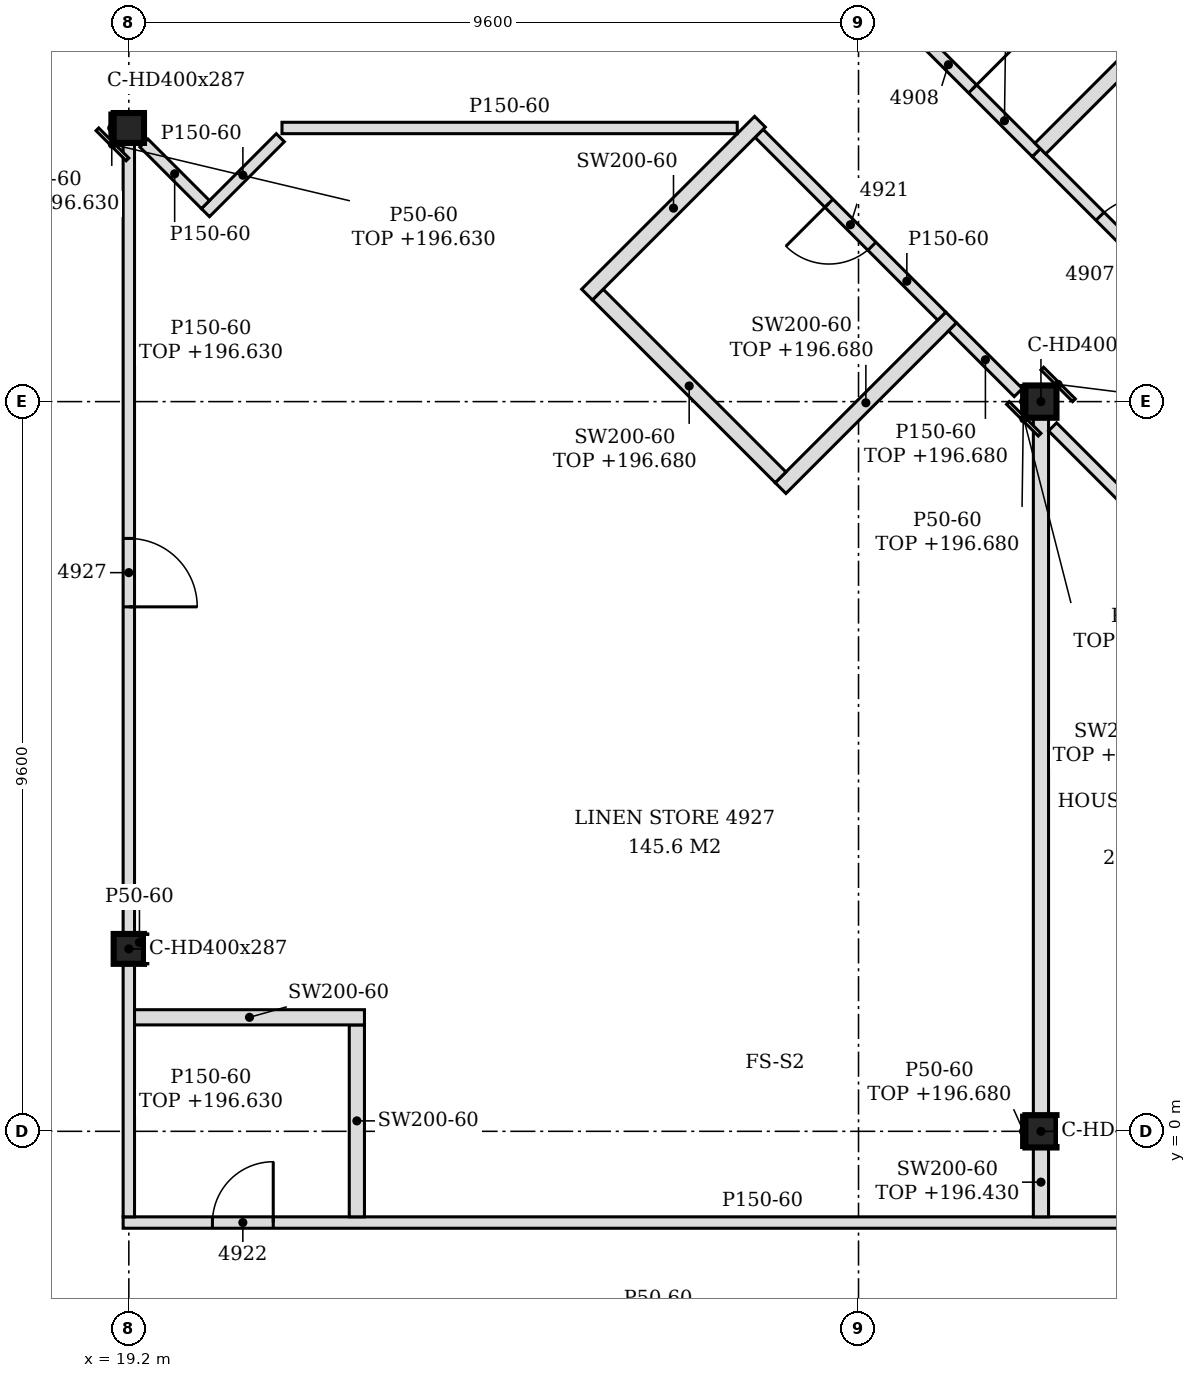
"""IFC4 building model, lengths in metres.
Left out: names, types, materials, properties, quantities, classifications, styles, units other than length and angle.
Written with IfcOpenShell. Run it as: python <this file> out.ifc"""

import sys

from ifc_helpers import new_model, si_unit, direction, frame, frame_2d, origin, origin_2d, place, context, subcontext, project, spatial, polyline, rectangle, i_section, outline, extrude, element, fill, save


model = new_model("IFC4")
c1 = context("Model", 3, precision=1e-05, world=origin(), true_north=direction((0.0, 1.0)))
c2 = subcontext(c1, "Body", "Model", "MODEL_VIEW")
j1 = project(units=[si_unit("LENGTHUNIT", "METRE"), si_unit("PLANEANGLEUNIT", "RADIAN")], contexts=[c1])
p1 = place(None, origin())
s1 = spatial("IfcSite", under=j1, at=p1, CompositionType="ELEMENT")
p2 = place(p1, origin())
s2 = spatial("IfcBuilding", under=s1, at=p2, CompositionType="ELEMENT")
p3 = place(p2, frame((0.0, 0.0, 193.8)))
s3 = spatial("IfcBuildingStorey", under=s2, at=p3, CompositionType="ELEMENT", Elevation=193.8)
for number, where, z_axis, x_axis in (
    (1, (19.2, 2.4, -0.15), (0.0, 0.0, 1.0), (1.0, 0.0, 0.0)),
    (2, (19.2, 13.2, -0.15), (0.0, 0.0, 1.0), (1.0, 0.0, 0.0)),
):
    element("IfcColumn", number, at=place(p3, frame(where, z_axis=z_axis, x_axis=x_axis)), inside=s3, PredefinedType="COLUMN", context=c2, shape_type="SweptSolid", body=[
        extrude(i_section(OverallWidth=0.399, OverallDepth=0.393, WebThickness=0.023, FlangeThickness=0.037, FilletRadius=0.015, at=origin_2d()), origin(), (0.0, 0.0, 1.0), 3.6),
    ])
for number, where, z_axis, x_axis in (
    (3, (31.2, 0.0, -0.15), (0.0, 0.0, 1.0), (1.0, 0.0, 0.0)),
    (4, (31.2, 9.6, -0.15), (0.0, 0.0, 1.0), (1.0, 0.0, 0.0)),
):
    element("IfcColumn", number, at=place(p3, frame(where, z_axis=z_axis, x_axis=x_axis)), inside=s3, PredefinedType="COLUMN", context=c2, shape_type="SweptSolid", body=[
        extrude(i_section(OverallWidth=0.409, OverallDepth=0.425, WebThickness=0.033, FlangeThickness=0.052, FilletRadius=0.015, at=origin_2d()), origin(), (0.0, 0.0, 1.0), 3.6),
    ])
p4 = place(p3, frame((19.125, -1.2, 0.0), z_axis=(0.0, 0.0, 1.0), x_axis=(1.0, 0.0, 0.0)))
e5 = element("IfcWall", 5, at=p4, inside=s3, PredefinedType="PARTITIONING", context=c2, shape_type="SweptSolid", body=[
    extrude(outline(polyline([(0.0, 0.0), (14.85, 0.0), (14.85, 3.45), (12.225, 3.45), (12.223, 2.63), (11.925, 2.63), (11.923, 3.45), (0.225, 3.45), (0.223, 2.83), (0.0, 2.83), (0.0, 0.0)])), frame((0.0, 0.075, 0.0), z_axis=(0.0, -1.0, 0.0), x_axis=(1.0, 0.0, 0.0)), (0.0, 0.0, 1.0), 0.15),
])
p5 = place(p4, frame((1.175, 0.0, 0.0)))
e6 = element("IfcOpeningElement", 6, at=p5, cuts=e5, PredefinedType="OPENING", context=c2, shape_type="SweptSolid", body=[
    extrude(rectangle(XDim=0.8, YDim=2.1, at=frame_2d((0.4, 1.05))), frame((0.0, 0.085, 0.0), z_axis=(0.0, -1.0, 0.0), x_axis=(1.0, 0.0, 0.0)), (0.0, 0.0, 1.0), 0.17),
])
p6 = place(p3, frame((19.2, -1.125, 0.0), z_axis=(0.0, 0.0, 1.0), x_axis=(0.0, 1.0, 0.0)))
e7 = element("IfcWall", 7, at=p6, inside=s3, PredefinedType="PARTITIONING", context=c2, shape_type="SweptSolid", body=[
    extrude(rectangle(XDim=3.329, YDim=0.15, at=frame_2d((1.664, 0.0))), origin(), (0.0, 0.0, 1.0), 2.83),
])
p7 = place(p3, frame((22.2, -1.125, 0.0), z_axis=(0.0, 0.0, 1.0), x_axis=(0.0, 1.0, 0.0)))
e8 = element("IfcWall", 8, at=p7, inside=s3, PredefinedType="PARTITIONING", context=c2, shape_type="SweptSolid", body=[
    extrude(outline(polyline([(0.0, 0.0), (2.525, 0.0), (2.525, 3.45), (1.38, 3.45), (1.378, 2.88), (1.17, 2.88), (1.168, 3.45), (0.0, 3.45), (0.0, 0.0)])), frame((0.0, 0.1, 0.0), z_axis=(0.0, -1.0, 0.0), x_axis=(1.0, 0.0, 0.0)), (0.0, 0.0, 1.0), 0.2),
])
p8 = place(p3, frame((31.2, -1.125, 0.0), z_axis=(0.0, 0.0, 1.0), x_axis=(0.0, 1.0, 0.0)))
e9 = element("IfcWall", 9, at=p8, inside=s3, PredefinedType="PARTITIONING", context=c2, shape_type="SweptSolid", body=[
    extrude(rectangle(XDim=0.913, YDim=0.2, at=frame_2d((0.456, 0.0))), origin(), (0.0, 0.0, 1.0), 2.63),
])
p9 = place(p3, frame((31.2, 0.212, 0.0), z_axis=(0.0, 0.0, 1.0), x_axis=(0.0, 1.0, 0.0)))
e10 = element("IfcWall", 10, at=p9, inside=s3, PredefinedType="PARTITIONING", context=c2, shape_type="SweptSolid", body=[
    extrude(rectangle(XDim=9.175, YDim=0.2, at=frame_2d((4.587, 0.0))), origin(), (0.0, 0.0, 1.0), 2.93),
])
p10 = place(p3, frame((19.275, 1.5, 0.0), z_axis=(0.0, 0.0, 1.0), x_axis=(1.0, 0.0, 0.0)))
e11 = element("IfcWall", 11, at=p10, inside=s3, PredefinedType="PARTITIONING", context=c2, shape_type="SweptSolid", body=[
    extrude(outline(polyline([(0.0, 0.0), (3.025, 0.0), (3.025, 3.45), (0.075, 3.45), (0.073, 2.83), (0.0, 2.83), (0.0, 0.0)])), frame((0.0, 0.1, 0.0), z_axis=(0.0, -1.0, 0.0), x_axis=(1.0, 0.0, 0.0)), (0.0, 0.0, 1.0), 0.2),
])
p11 = place(p3, frame((19.2, 2.596, 0.0), z_axis=(0.0, 0.0, 1.0), x_axis=(0.0, 1.0, 0.0)))
e12 = element("IfcWall", 12, at=p11, inside=s3, PredefinedType="PARTITIONING", context=c2, shape_type="SweptSolid", body=[
    extrude(rectangle(XDim=10.407, YDim=0.15, at=frame_2d((5.204, 0.0))), origin(), (0.0, 0.0, 1.0), 2.83),
])
p12 = place(p11, frame((4.303, 0.0, 0.0)))
e13 = element("IfcOpeningElement", 13, at=p12, cuts=e12, PredefinedType="OPENING", context=c2, shape_type="SweptSolid", body=[
    extrude(rectangle(XDim=0.9, YDim=2.1, at=frame_2d((0.45, 1.05))), frame((0.0, 0.085, 0.0), z_axis=(0.0, -1.0, 0.0), x_axis=(1.0, 0.0, 0.0)), (0.0, 0.0, 1.0), 0.17),
])
p13 = place(p3, frame((33.772, 6.849, 0.0), z_axis=(0.0, 0.0, 1.0), x_axis=(-0.707106781187, 0.707106781187, 0.0)))
e14 = element("IfcWall", 14, at=p13, inside=s3, PredefinedType="PARTITIONING", context=c2, shape_type="SweptSolid", body=[
    extrude(rectangle(XDim=3.421, YDim=0.15, at=frame_2d((1.71, 0.0))), origin(), (0.0, 0.0, 1.0), 2.93),
])
p14 = place(p3, frame((36.172, 7.843, 0.0), z_axis=(0.0, 0.0, 1.0), x_axis=(-0.70712393086, 0.707089631097, 0.0)))
e15 = element("IfcWall", 15, at=p14, inside=s3, PredefinedType="PARTITIONING", context=c2, shape_type="SweptSolid", body=[
    extrude(rectangle(XDim=7.118, YDim=0.15, at=frame_2d((3.559, 0.0))), origin(), (0.0, 0.0, 1.0), 2.83),
])
p15 = place(p14, frame((1.763, 0.0, 0.0)))
e16 = element("IfcOpeningElement", 16, at=p15, cuts=e15, PredefinedType="OPENING", context=c2, shape_type="SweptSolid", body=[
    extrude(rectangle(XDim=0.9, YDim=2.1, at=frame_2d((0.45, 1.05))), frame((0.0, 0.085, 0.0), z_axis=(0.0, -1.0, 0.0), x_axis=(1.0, 0.0, 0.0)), (0.0, 0.0, 1.0), 0.17),
])
p16 = place(p14, frame((5.033, 0.0, 0.0)))
e17 = element("IfcOpeningElement", 17, at=p16, cuts=e15, PredefinedType="OPENING", context=c2, shape_type="SweptSolid", body=[
    extrude(rectangle(XDim=0.9, YDim=2.1, at=frame_2d((0.45, 1.05))), frame((0.0, 0.085, 0.0), z_axis=(0.0, -1.0, 0.0), x_axis=(1.0, 0.0, 0.0)), (0.0, 0.0, 1.0), 0.17),
])
p17 = place(p3, frame((27.774, 8.462, 0.0), z_axis=(0.0, 0.0, 1.0), x_axis=(0.707106781187, 0.707106781187, 0.0)))
e18 = element("IfcWall", 18, at=p17, inside=s3, PredefinedType="PARTITIONING", context=c2, shape_type="SweptSolid", body=[
    extrude(rectangle(XDim=3.174, YDim=0.2, at=frame_2d((1.587, 0.0))), origin(), (0.0, 0.0, 1.0), 2.88),
])
p18 = place(p3, frame((27.774, 8.604, 0.0), z_axis=(0.0, 0.0, 1.0), x_axis=(-0.707142675843, 0.707070884708, 0.0)))
e19 = element("IfcWall", 19, at=p18, inside=s3, PredefinedType="PARTITIONING", context=c2, shape_type="SweptSolid", body=[
    extrude(rectangle(XDim=3.401, YDim=0.2, at=frame_2d((1.7, 0.0))), origin(), (0.0, 0.0, 1.0), 2.88),
])
p19 = place(p3, frame((30.902, 9.719, 0.0), z_axis=(0.0, 0.0, 1.0), x_axis=(-0.707406212347, 0.706807223175, 0.0)))
e20 = element("IfcWall", 20, at=p19, inside=s3, PredefinedType="PARTITIONING", context=c2, shape_type="SweptSolid", body=[
    extrude(rectangle(XDim=1.223, YDim=0.15, at=frame_2d((0.611, 0.0))), origin(), (0.0, 0.0, 1.0), 2.88),
])
p20 = place(p3, frame((29.895, 10.725, 0.0), z_axis=(0.0, 0.0, 1.0), x_axis=(-0.706927244117, 0.707286272682, 0.0)))
e21 = element("IfcWall", 21, at=p20, inside=s3, PredefinedType="PARTITIONING", context=c2, shape_type="SweptSolid", body=[
    extrude(rectangle(XDim=3.4, YDim=0.15, at=frame_2d((1.7, 0.0))), origin(), (0.0, 0.0, 1.0), 3.45),
])
p21 = place(p20, frame((1.3, 0.0, 0.0)))
e22 = element("IfcOpeningElement", 22, at=p21, cuts=e21, PredefinedType="OPENING", context=c2, shape_type="SweptSolid", body=[
    extrude(rectangle(XDim=0.8, YDim=2.1, at=frame_2d((0.4, 1.05))), frame((0.0, 0.085, 0.0), z_axis=(0.0, -1.0, 0.0), x_axis=(1.0, 0.0, 0.0)), (0.0, 0.0, 1.0), 0.17),
])
p22 = place(p3, frame((25.228, 11.008, 0.0), z_axis=(0.0, 0.0, 1.0), x_axis=(0.707296501544, 0.706917009913, 0.0)))
e23 = element("IfcWall", 23, at=p22, inside=s3, PredefinedType="PARTITIONING", context=c2, shape_type="SweptSolid", body=[
    extrude(rectangle(XDim=3.217, YDim=0.2, at=frame_2d((1.608, 0.0))), origin(), (0.0, 0.0, 1.0), 3.45),
])
p23 = place(p3, frame((20.208, 12.086, 0.0), z_axis=(0.0, 0.0, 1.0), x_axis=(0.706756381459, 0.707457007363, 0.0)))
e24 = element("IfcWall", 24, at=p23, inside=s3, PredefinedType="PARTITIONING", context=c2, shape_type="SweptSolid", body=[
    extrude(rectangle(XDim=1.394, YDim=0.15, at=frame_2d((0.697, 0.0))), origin(), (0.0, 0.0, 1.0), 3.45),
])
p24 = place(p3, frame((20.208, 12.192, 0.0), z_axis=(0.0, 0.0, 1.0), x_axis=(-0.70721334539, 0.707000200921, 0.0)))
e25 = element("IfcWall", 25, at=p24, inside=s3, PredefinedType="PARTITIONING", context=c2, shape_type="SweptSolid", body=[
    extrude(rectangle(XDim=1.146, YDim=0.15, at=frame_2d((0.573, 0.0))), origin(), (0.0, 0.0, 1.0), 3.45),
])
p25 = place(p3, frame((31.139, 12.876, 0.0), z_axis=(0.0, 0.0, 1.0), x_axis=(-0.707260784618, 0.706952744207, 0.0)))
e26 = element("IfcWall", 26, at=p25, inside=s3, PredefinedType="PARTITIONING", context=c2, shape_type="SweptSolid", body=[
    extrude(rectangle(XDim=3.17, YDim=0.15, at=frame_2d((1.585, 0.0))), origin(), (0.0, 0.0, 1.0), 2.83),
])
p26 = place(p25, frame((1.185, 0.0, 0.0)))
e27 = element("IfcOpeningElement", 27, at=p26, cuts=e26, PredefinedType="OPENING", context=c2, shape_type="SweptSolid", body=[
    extrude(rectangle(XDim=0.9, YDim=2.1, at=frame_2d((0.45, 1.05))), frame((0.0, 0.085, 0.0), z_axis=(0.0, -1.0, 0.0), x_axis=(1.0, 0.0, 0.0)), (0.0, 0.0, 1.0), 0.17),
])
p27 = place(p3, frame((31.192, 12.929, 0.0), z_axis=(0.0, 0.0, 1.0), x_axis=(0.70701981688, 0.707193734799, 0.0)))
e28 = element("IfcWall", 28, at=p27, inside=s3, PredefinedType="PARTITIONING", context=c2, shape_type="SweptSolid", body=[
    extrude(rectangle(XDim=5.615, YDim=0.2, at=frame_2d((2.808, 0.0))), origin(), (0.0, 0.0, 1.0), 2.63),
])
p28 = place(p3, frame((21.215, 13.2, 0.0), z_axis=(0.0, 0.0, 1.0), x_axis=(1.0, 0.0, 0.0)))
e29 = element("IfcWall", 29, at=p28, inside=s3, PredefinedType="PARTITIONING", context=c2, shape_type="SweptSolid", body=[
    extrude(rectangle(XDim=5.99, YDim=0.15, at=frame_2d((2.995, 0.0))), origin(), (0.0, 0.0, 1.0), 3.45),
])
p29 = place(p3, frame((19.425, 2.204, 0.0), z_axis=(0.0, 0.0, 1.0), x_axis=(0.0, 1.0, 0.0)))
e30 = element("IfcWall", 30, at=p29, inside=s3, PredefinedType="PARTITIONING", context=c2, shape_type="SweptSolid", body=[
    extrude(rectangle(XDim=0.393, YDim=0.05, at=frame_2d((0.196, 0.0))), origin(), (0.0, 0.0, 1.0), 3.45),
])
p30 = place(p3, frame((18.976, 13.003, 0.0), z_axis=(0.0, 0.0, 1.0), x_axis=(0.0, 1.0, 0.0)))
e31 = element("IfcWall", 31, at=p30, inside=s3, PredefinedType="PARTITIONING", context=c2, shape_type="SweptSolid", body=[
    extrude(rectangle(XDim=0.393, YDim=0.05, at=frame_2d((0.197, 0.0))), origin(), (0.0, 0.0, 1.0), 2.83),
])
p31 = place(p3, frame((30.97, -0.212, 0.0), z_axis=(0.0, 0.0, 1.0), x_axis=(0.0, 1.0, 0.0)))
e32 = element("IfcWall", 32, at=p31, inside=s3, PredefinedType="PARTITIONING", context=c2, shape_type="SweptSolid", body=[
    extrude(rectangle(XDim=0.425, YDim=0.05, at=frame_2d((0.212, 0.0))), origin(), (0.0, 0.0, 1.0), 2.88),
])
p32 = place(p3, frame((30.97, 9.387, 0.0), z_axis=(0.0, 0.0, 1.0), x_axis=(0.0, 1.0, 0.0)))
e33 = element("IfcWall", 33, at=p32, inside=s3, PredefinedType="PARTITIONING", context=c2, shape_type="SweptSolid", body=[
    extrude(rectangle(XDim=0.425, YDim=0.05, at=frame_2d((0.212, 0.0))), origin(), (0.0, 0.0, 1.0), 2.88),
])
p33 = place(p3, frame((31.183, 9.165, 0.0), z_axis=(0.0, 0.0, 1.0), x_axis=(-0.707520656867, 0.70669266312, 0.0)))
e34 = element("IfcWall", 34, at=p33, inside=s3, PredefinedType="PARTITIONING", context=c2, shape_type="SweptSolid", body=[
    extrude(rectangle(XDim=0.59, YDim=0.05, at=frame_2d((0.295, 0.0))), origin(), (0.0, 0.0, 1.0), 2.93),
])
p34 = place(p3, frame((31.635, 9.618, 0.0), z_axis=(0.0, 0.0, 1.0), x_axis=(-0.707520656867, 0.70669266312, 0.0)))
e35 = element("IfcWall", 35, at=p34, inside=s3, PredefinedType="PARTITIONING", context=c2, shape_type="SweptSolid", body=[
    extrude(rectangle(XDim=0.59, YDim=0.05, at=frame_2d((0.295, 0.0))), origin(), (0.0, 0.0, 1.0), 2.83),
])
p35 = place(p3, frame((19.182, 12.786, 0.0), z_axis=(0.0, 0.0, 1.0), x_axis=(-0.707106781187, 0.707106781187, 0.0)))
e36 = element("IfcWall", 36, at=p35, inside=s3, PredefinedType="PARTITIONING", context=c2, shape_type="SweptSolid", body=[
    extrude(rectangle(XDim=0.56, YDim=0.05, at=frame_2d((0.28, 0.0))), origin(), (0.0, 0.0, 1.0), 2.83),
])
p36 = place(p16, frame((0.9, 0.0, 0.0), z_axis=(0.0, 0.0, 1.0), x_axis=(-1.0, 0.0, 0.0)))
e37 = element("IfcDoor", 37, at=p36, inside=s3, OperationType="SINGLE_SWING_RIGHT", PredefinedType="DOOR", context=c2, shape_type="SweptSolid", body=[
    extrude(rectangle(XDim=0.9, YDim=2.1, at=frame_2d((0.45, 1.05))), frame((0.0, 0.025, 0.0), z_axis=(0.0, -1.0, 0.0), x_axis=(1.0, 0.0, 0.0)), (0.0, 0.0, 1.0), 0.05),
])
fill(e17, e37)
p37 = place(p26, frame((0.9, 0.0, 0.0), z_axis=(0.0, 0.0, 1.0), x_axis=(-1.0, 0.0, 0.0)))
e38 = element("IfcDoor", 38, at=p37, inside=s3, OperationType="SINGLE_SWING_RIGHT", PredefinedType="DOOR", context=c2, shape_type="SweptSolid", body=[
    extrude(rectangle(XDim=0.9, YDim=2.1, at=frame_2d((0.45, 1.05))), frame((0.0, 0.025, 0.0), z_axis=(0.0, -1.0, 0.0), x_axis=(1.0, 0.0, 0.0)), (0.0, 0.0, 1.0), 0.05),
])
fill(e27, e38)
p38 = place(p21, origin())
e39 = element("IfcDoor", 39, at=p38, inside=s3, OperationType="SINGLE_SWING_RIGHT", PredefinedType="DOOR", context=c2, shape_type="SweptSolid", body=[
    extrude(rectangle(XDim=0.8, YDim=2.1, at=frame_2d((0.4, 1.05))), frame((0.0, 0.025, 0.0), z_axis=(0.0, -1.0, 0.0), x_axis=(1.0, 0.0, 0.0)), (0.0, 0.0, 1.0), 0.05),
])
fill(e22, e39)
p39 = place(p5, origin())
e40 = element("IfcDoor", 40, at=p39, inside=s3, OperationType="SINGLE_SWING_RIGHT", PredefinedType="DOOR", context=c2, shape_type="SweptSolid", body=[
    extrude(rectangle(XDim=0.8, YDim=2.1, at=frame_2d((0.4, 1.05))), frame((0.0, 0.025, 0.0), z_axis=(0.0, -1.0, 0.0), x_axis=(1.0, 0.0, 0.0)), (0.0, 0.0, 1.0), 0.05),
])
fill(e6, e40)
p40 = place(p12, frame((0.9, 0.0, 0.0), z_axis=(0.0, 0.0, 1.0), x_axis=(-1.0, 0.0, 0.0)))
e41 = element("IfcDoor", 41, at=p40, inside=s3, OperationType="SINGLE_SWING_RIGHT", PredefinedType="DOOR", context=c2, shape_type="SweptSolid", body=[
    extrude(rectangle(XDim=0.9, YDim=2.1, at=frame_2d((0.45, 1.05))), frame((0.0, 0.025, 0.0), z_axis=(0.0, -1.0, 0.0), x_axis=(1.0, 0.0, 0.0)), (0.0, 0.0, 1.0), 0.05),
])
fill(e13, e41)
save(model, sys.argv[1])
